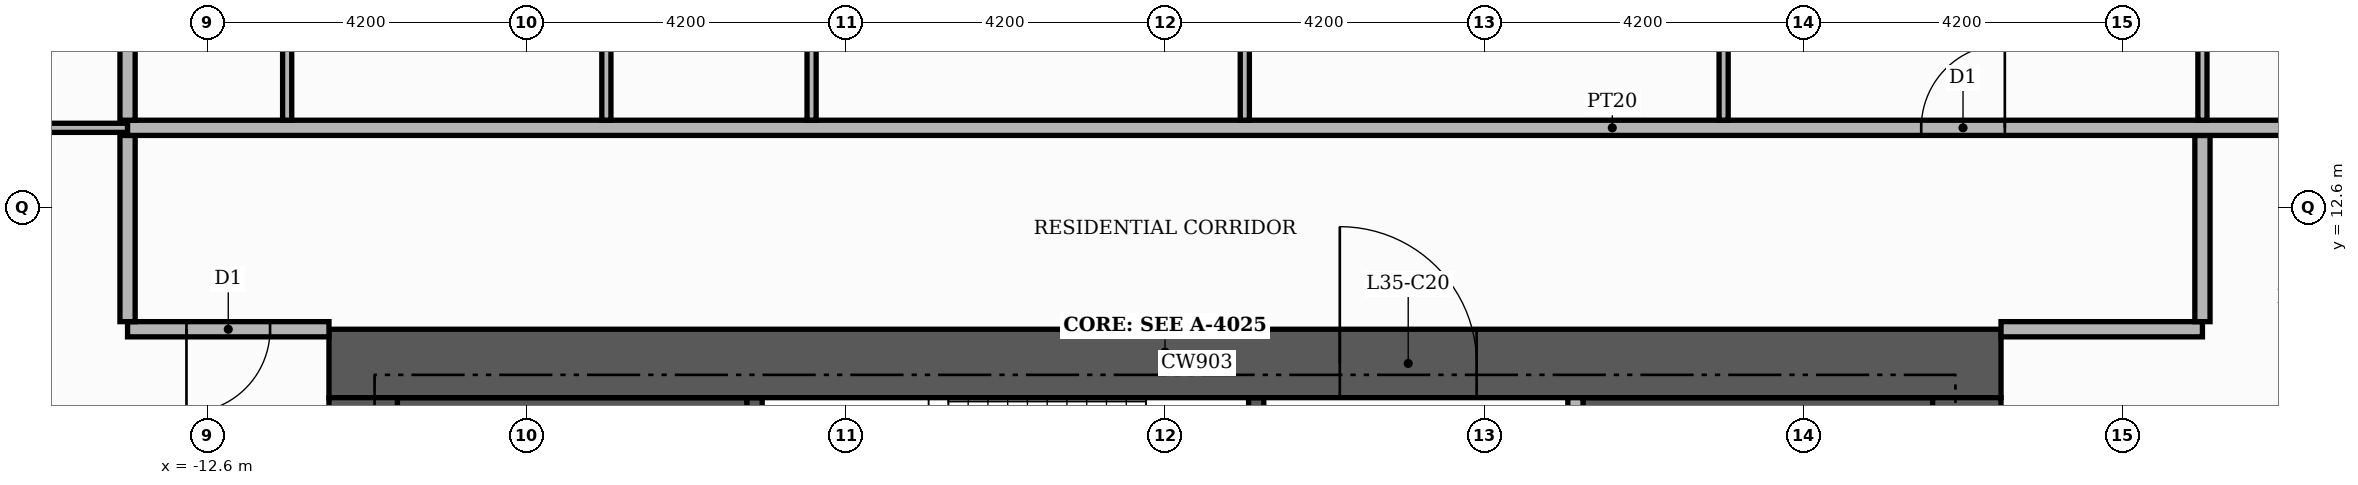
"""IFC4 building model, lengths in metres.
Left out: names, types, materials, properties, quantities, classifications, styles, units other than length and angle.
Written with IfcOpenShell. Run it as: python <this file> out.ifc"""

import sys

from ifc_helpers import new_model, si_unit, direction, frame, frame_2d, origin, place, context, subcontext, project, spatial, rectangle, extrude, element, fill, save


model = new_model("IFC4")
c1 = context("Model", 3, precision=1e-05, world=origin(), true_north=direction((0.0, 1.0)))
c2 = subcontext(c1, "Body", "Model", "MODEL_VIEW")
j1 = project(units=[si_unit("LENGTHUNIT", "METRE"), si_unit("PLANEANGLEUNIT", "RADIAN")], contexts=[c1])
p1 = place(None, origin())
s1 = spatial("IfcSite", under=j1, at=p1, CompositionType="ELEMENT")
p2 = place(p1, origin())
s2 = spatial("IfcBuilding", under=s1, at=p2, CompositionType="ELEMENT")
p3 = place(p2, frame((0.0, 0.0, 149.4)))
s3 = spatial("IfcBuildingStorey", under=s2, at=p3, CompositionType="ELEMENT", Elevation=149.4)
for number, where, z_axis, x_axis in (
    (1, (-10.1, 9.15, 0.0), (0.0, 0.0, 1.0), (1.0, 0.0, 0.0)),
    (2, (5.5, 9.15, 0.0), (0.0, 0.0, 1.0), (1.0, 0.0, 0.0)),
):
    element("IfcWall", number, at=place(p3, frame(where, z_axis=z_axis, x_axis=x_axis)), inside=s3, PredefinedType="SHEAR", context=c2, shape_type="SweptSolid", body=[
        extrude(rectangle(XDim=4.6, YDim=1.9, at=frame_2d((2.3, 0.0))), origin(), (0.0, 0.0, 1.0), 3.48),
    ])
p4 = place(p3, frame((-5.4, 7.25, 0.0), z_axis=(0.0, 0.0, 1.0), x_axis=(0.0, 1.0, 0.0)))
e3 = element("IfcWall", 3, at=p4, inside=s3, PredefinedType="SHEAR", context=c2, shape_type="SweptSolid", body=[
    extrude(rectangle(XDim=2.85, YDim=0.2, at=frame_2d((1.425, 0.0))), origin(), (0.0, 0.0, 1.0), 3.48),
])
p5 = place(p3, frame((1.2, 7.25, 0.0), z_axis=(0.0, 0.0, 1.0), x_axis=(0.0, 1.0, 0.0)))
e4 = element("IfcWall", 4, at=p5, inside=s3, PredefinedType="SHEAR", context=c2, shape_type="SweptSolid", body=[
    extrude(rectangle(XDim=2.85, YDim=0.2, at=frame_2d((1.425, 0.0))), origin(), (0.0, 0.0, 1.0), 3.48),
])
p6 = place(p5, frame((0.85, 0.0, 0.0)))
e5 = element("IfcOpeningElement", 5, at=p6, cuts=e4, PredefinedType="OPENING", context=c2, shape_type="SweptSolid", body=[
    extrude(rectangle(XDim=1.0, YDim=2.1, at=frame_2d((0.5, 1.05))), frame((0.0, 0.11, 0.0), z_axis=(0.0, -1.0, 0.0), x_axis=(1.0, 0.0, 0.0)), (0.0, 0.0, 1.0), 0.22),
])
p7 = place(p3, frame((-11.0, 10.55, 0.0), z_axis=(0.0, 0.0, 1.0), x_axis=(1.0, 0.0, 0.0)))
e6 = element("IfcWall", 6, at=p7, inside=s3, PredefinedType="SHEAR", context=c2, shape_type="SweptSolid", body=[
    extrude(rectangle(XDim=22.0, YDim=0.9, at=frame_2d((11.0, 0.0))), origin(), (0.0, 0.0, 1.0), 3.48),
])
p8 = place(p7, frame((13.3, 0.0, 0.0)))
e7 = element("IfcOpeningElement", 7, at=p8, cuts=e6, PredefinedType="OPENING", context=c2, shape_type="SweptSolid", body=[
    extrude(rectangle(XDim=1.8, YDim=2.2, at=frame_2d((0.9, 1.1))), frame((0.0, 0.46, 0.0), z_axis=(0.0, -1.0, 0.0), x_axis=(1.0, 0.0, 0.0)), (0.0, 0.0, 1.0), 0.92),
])
for number, where, z_axis, x_axis in (
    (8, (-10.55, -10.1, 0.0), (0.0, 0.0, 1.0), (0.0, 1.0, 0.0)),
    (9, (10.55, -10.1, 0.0), (0.0, 0.0, 1.0), (0.0, 1.0, 0.0)),
):
    element("IfcWall", number, at=place(p3, frame(where, z_axis=z_axis, x_axis=x_axis)), inside=s3, PredefinedType="SHEAR", context=c2, shape_type="SweptSolid", body=[
        extrude(rectangle(XDim=20.2, YDim=0.9, at=frame_2d((10.1, 0.0))), origin(), (0.0, 0.0, 1.0), 3.48),
    ])
p9 = place(p3, frame((5.4, 5.5, 0.0), z_axis=(0.0, 0.0, 1.0), x_axis=(0.0, 1.0, 0.0)))
e10 = element("IfcWall", 10, at=p9, inside=s3, PredefinedType="PARTITIONING", context=c2, shape_type="SweptSolid", body=[
    extrude(rectangle(XDim=4.6, YDim=0.2, at=frame_2d((2.3, 0.0))), origin(), (0.0, 0.0, 1.0), 3.48),
])
p10 = place(p9, frame((0.25, 0.0, 0.0)))
e11 = element("IfcOpeningElement", 11, at=p10, cuts=e10, PredefinedType="OPENING", context=c2, shape_type="SweptSolid", body=[
    extrude(rectangle(XDim=1.0, YDim=2.1, at=frame_2d((0.5, 1.05))), frame((0.0, 0.11, 0.0), z_axis=(0.0, -1.0, 0.0), x_axis=(1.0, 0.0, 0.0)), (0.0, 0.0, 1.0), 0.22),
])
p11 = place(p3, frame((-13.65, 11.0, 0.0), z_axis=(0.0, 0.0, 1.0), x_axis=(1.0, 0.0, 0.0)))
e12 = element("IfcWall", 12, at=p11, inside=s3, PredefinedType="PARTITIONING", context=c2, shape_type="SweptSolid", body=[
    extrude(rectangle(XDim=2.65, YDim=0.2, at=frame_2d((1.325, 0.0))), origin(), (0.0, 0.0, 1.0), 3.48),
])
p12 = place(p11, frame((0.775, 0.0, 0.0)))
e13 = element("IfcOpeningElement", 13, at=p12, cuts=e12, PredefinedType="OPENING", context=c2, shape_type="SweptSolid", body=[
    extrude(rectangle(XDim=1.1, YDim=2.4, at=frame_2d((0.55, 1.2))), frame((0.0, 0.11, 0.0), z_axis=(0.0, -1.0, 0.0), x_axis=(1.0, 0.0, 0.0)), (0.0, 0.0, 1.0), 0.22),
])
p13 = place(p3, frame((11.0, 11.0, 0.0), z_axis=(0.0, 0.0, 1.0), x_axis=(1.0, 0.0, 0.0)))
e14 = element("IfcWall", 14, at=p13, inside=s3, PredefinedType="PARTITIONING", context=c2, shape_type="SweptSolid", body=[
    extrude(rectangle(XDim=2.65, YDim=0.2, at=frame_2d((1.325, 0.0))), origin(), (0.0, 0.0, 1.0), 3.48),
])
for number, where, z_axis, x_axis in (
    (15, (-13.65, 11.1, 0.0), (0.0, 0.0, 1.0), (0.0, 1.0, 0.0)),
    (16, (13.65, 11.1, 0.0), (0.0, 0.0, 1.0), (0.0, 1.0, 0.0)),
):
    element("IfcWall", number, at=place(p3, frame(where, z_axis=z_axis, x_axis=x_axis)), inside=s3, PredefinedType="PARTITIONING", context=c2, shape_type="SweptSolid", body=[
        extrude(rectangle(XDim=2.45, YDim=0.2, at=frame_2d((1.225, 0.0))), origin(), (0.0, 0.0, 1.0), 3.48),
    ])
p14 = place(p3, frame((-20.12, 13.65, 0.0), z_axis=(0.0, 0.0, 1.0), x_axis=(1.0, 0.0, 0.0)))
e17 = element("IfcWall", 17, at=p14, inside=s3, PredefinedType="PARTITIONING", context=c2, shape_type="SweptSolid", body=[
    extrude(rectangle(XDim=6.47, YDim=0.12, at=frame_2d((3.235, 0.0))), origin(), (0.0, 0.0, 1.0), 3.48),
])
p15 = place(p14, frame((2.785, 0.0, 0.0)))
e18 = element("IfcOpeningElement", 18, at=p15, cuts=e17, PredefinedType="OPENING", context=c2, shape_type="SweptSolid", body=[
    extrude(rectangle(XDim=0.9, YDim=2.1, at=frame_2d((0.45, 1.05))), frame((0.0, 0.07, 0.0), z_axis=(0.0, -1.0, 0.0), x_axis=(1.0, 0.0, 0.0)), (0.0, 0.0, 1.0), 0.14),
])
p16 = place(p3, frame((-13.65, 13.65, 0.0), z_axis=(0.0, 0.0, 1.0), x_axis=(1.0, 0.0, 0.0)))
e19 = element("IfcWall", 19, at=p16, inside=s3, PredefinedType="PARTITIONING", context=c2, shape_type="SweptSolid", body=[
    extrude(rectangle(XDim=39.07, YDim=0.2, at=frame_2d((19.535, 0.0))), origin(), (0.0, 0.0, 1.0), 3.48),
])
p17 = place(p16, frame((23.6, 0.0, 0.0)))
e20 = element("IfcOpeningElement", 20, at=p17, cuts=e19, PredefinedType="OPENING", context=c2, shape_type="SweptSolid", body=[
    extrude(rectangle(XDim=1.1, YDim=2.4, at=frame_2d((0.55, 1.2))), frame((0.0, 0.11, 0.0), z_axis=(0.0, -1.0, 0.0), x_axis=(1.0, 0.0, 0.0)), (0.0, 0.0, 1.0), 0.22),
])
p18 = place(p3, frame((-13.65, 13.75, 0.0), z_axis=(0.0, 0.0, 1.0), x_axis=(0.0, 1.0, 0.0)))
e21 = element("IfcWall", 21, at=p18, inside=s3, PredefinedType="PARTITIONING", context=c2, shape_type="SweptSolid", body=[
    extrude(rectangle(XDim=11.67, YDim=0.2, at=frame_2d((5.835, 0.0))), origin(), (0.0, 0.0, 1.0), 3.48),
])
for number, where, z_axis, x_axis in (
    (22, (-11.55, 13.75, 0.0), (0.0, 0.0, 1.0), (0.0, 1.0, 0.0)),
    (23, (-7.35, 13.75, 0.0), (0.0, 0.0, 1.0), (0.0, 1.0, 0.0)),
    (24, (-4.65, 13.75, 0.0), (0.0, 0.0, 1.0), (0.0, 1.0, 0.0)),
    (25, (1.05, 13.75, 0.0), (0.0, 0.0, 1.0), (0.0, 1.0, 0.0)),
    (26, (7.35, 13.75, 0.0), (0.0, 0.0, 1.0), (0.0, 1.0, 0.0)),
):
    element("IfcWall", number, at=place(p3, frame(where, z_axis=z_axis, x_axis=x_axis)), inside=s3, PredefinedType="PARTITIONING", context=c2, shape_type="SweptSolid", body=[
        extrude(rectangle(XDim=5.11, YDim=0.12, at=frame_2d((2.555, 0.0))), origin(), (0.0, 0.0, 1.0), 3.48),
    ])
p19 = place(p3, frame((13.65, 13.75, 0.0), z_axis=(0.0, 0.0, 1.0), x_axis=(0.0, 1.0, 0.0)))
e27 = element("IfcWall", 27, at=p19, inside=s3, PredefinedType="PARTITIONING", context=c2, shape_type="SweptSolid", body=[
    extrude(rectangle(XDim=6.61, YDim=0.12, at=frame_2d((3.305, 0.0))), origin(), (0.0, 0.0, 1.0), 3.48),
])
p20 = place(p19, frame((2.835, 0.0, 0.0)))
e28 = element("IfcOpeningElement", 28, at=p20, cuts=e27, PredefinedType="OPENING", context=c2, shape_type="SweptSolid", body=[
    extrude(rectangle(XDim=0.9, YDim=2.1, at=frame_2d((0.45, 1.05))), frame((0.0, 0.07, 0.0), z_axis=(0.0, -1.0, 0.0), x_axis=(1.0, 0.0, 0.0)), (0.0, 0.0, 1.0), 0.14),
])
p21 = place(p8, origin())
e29 = element("IfcDoor", 29, at=p21, inside=s3, OperationType="DOUBLE_DOOR_SINGLE_SWING", PredefinedType="DOOR", context=c2, shape_type="SweptSolid", body=[
    extrude(rectangle(XDim=1.8, YDim=2.2, at=frame_2d((0.9, 1.1))), frame((0.0, 0.025, 0.0), z_axis=(0.0, -1.0, 0.0), x_axis=(1.0, 0.0, 0.0)), (0.0, 0.0, 1.0), 0.05),
])
fill(e7, e29)
p22 = place(p17, origin())
e30 = element("IfcDoor", 30, at=p22, inside=s3, OperationType="SINGLE_SWING_RIGHT", PredefinedType="DOOR", context=c2, shape_type="SweptSolid", body=[
    extrude(rectangle(XDim=1.1, YDim=2.4, at=frame_2d((0.55, 1.2))), frame((0.0, 0.025, 0.0), z_axis=(0.0, -1.0, 0.0), x_axis=(1.0, 0.0, 0.0)), (0.0, 0.0, 1.0), 0.05),
])
fill(e20, e30)
p23 = place(p12, frame((1.1, 0.0, 0.0), z_axis=(0.0, 0.0, 1.0), x_axis=(-1.0, 0.0, 0.0)))
e31 = element("IfcDoor", 31, at=p23, inside=s3, OperationType="SINGLE_SWING_LEFT", PredefinedType="DOOR", context=c2, shape_type="SweptSolid", body=[
    extrude(rectangle(XDim=1.1, YDim=2.4, at=frame_2d((0.55, 1.2))), frame((0.0, 0.025, 0.0), z_axis=(0.0, -1.0, 0.0), x_axis=(1.0, 0.0, 0.0)), (0.0, 0.0, 1.0), 0.05),
])
fill(e13, e31)
save(model, sys.argv[1])
